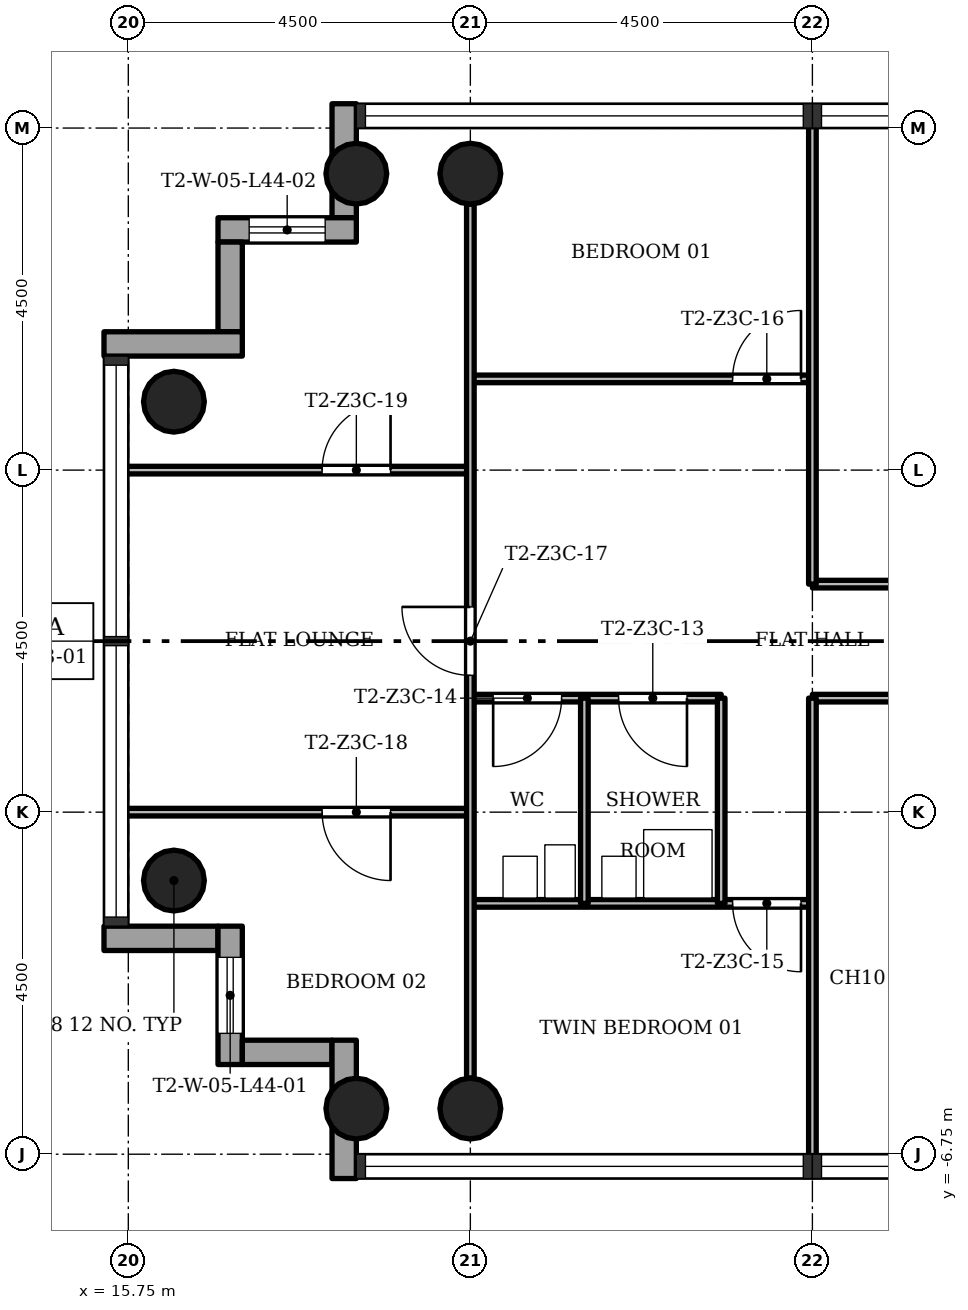
"""IFC4 building model, lengths in metres.
Left out: names, types, materials, properties, quantities, classifications, styles, units other than length and angle.
Written with IfcOpenShell. Run it as: python <this file> out.ifc"""

import sys

from ifc_helpers import new_model, si_unit, direction, frame, frame_2d, origin, origin_2d, place, context, subcontext, project, spatial, rectangle, hollow_circle, extrude, element, fill, save


model = new_model("IFC4")
c1 = context("Model", 3, precision=1e-05, world=origin(), true_north=direction((0.0, 1.0)))
c2 = subcontext(c1, "Body", "Model", "MODEL_VIEW")
j1 = project(units=[si_unit("LENGTHUNIT", "METRE"), si_unit("PLANEANGLEUNIT", "RADIAN")], contexts=[c1])
p1 = place(None, origin())
s1 = spatial("IfcSite", under=j1, at=p1, CompositionType="ELEMENT")
p2 = place(p1, origin())
s2 = spatial("IfcBuilding", under=s1, at=p2, CompositionType="ELEMENT")
p3 = place(p2, frame((0.0, 0.0, 160.9)))
s3 = spatial("IfcBuildingStorey", under=s2, at=p3, CompositionType="ELEMENT", Elevation=160.9)
for number, where, z_axis, x_axis in (
    (1, (20.25, 6.15, 0.0), (0.0, 0.0, 1.0), (1.0, 0.0, 0.0)),
    (2, (20.25, -6.15, 0.0), (0.0, 0.0, 1.0), (1.0, 0.0, 0.0)),
    (3, (18.75, 6.15, 0.0), (0.0, 0.0, 1.0), (1.0, 0.0, 0.0)),
    (4, (18.75, -6.15, 0.0), (0.0, 0.0, 1.0), (1.0, 0.0, 0.0)),
    (5, (16.35, 3.15, 0.0), (0.0, 0.0, 1.0), (1.0, 0.0, 0.0)),
    (6, (16.35, -3.15, 0.0), (0.0, 0.0, 1.0), (1.0, 0.0, 0.0)),
):
    element("IfcColumn", number, at=place(p3, frame(where, z_axis=z_axis, x_axis=x_axis)), inside=s3, PredefinedType="COLUMN", context=c2, shape_type="SweptSolid", body=[
        extrude(hollow_circle(Radius=0.4, WallThickness=0.028, at=origin_2d()), origin(), (0.0, 0.0, 1.0), 3.4),
    ])
p4 = place(p3, frame((18.59, 7.07, -0.3), z_axis=(0.0, 0.0, 1.0), x_axis=(0.0, -1.0, 0.0)))
e7 = element("IfcWall", 7, at=p4, inside=s3, PredefinedType="STANDARD", context=c2, shape_type="SweptSolid", body=[
    extrude(rectangle(XDim=1.5, YDim=0.32, at=frame_2d((0.75, 0.0))), origin(), (0.0, 0.0, 1.0), 3.4),
])
p5 = place(p3, frame((18.75, 5.41, -0.3), z_axis=(0.0, 0.0, 1.0), x_axis=(-1.0, 0.0, 0.0)))
e8 = element("IfcWall", 8, at=p5, inside=s3, PredefinedType="STANDARD", context=c2, shape_type="SweptSolid", body=[
    extrude(rectangle(XDim=1.82, YDim=0.32, at=frame_2d((0.91, 0.0))), origin(), (0.0, 0.0, 1.0), 3.4),
])
p6 = place(p5, frame((0.41, 0.0, 1.2)))
e9 = element("IfcOpeningElement", 9, at=p6, cuts=e8, PredefinedType="OPENING", context=c2, shape_type="SweptSolid", body=[
    extrude(rectangle(XDim=1.0, YDim=1.5, at=frame_2d((0.5, 0.75))), frame((0.0, 0.17, 0.0), z_axis=(0.0, -1.0, 0.0), x_axis=(1.0, 0.0, 0.0)), (0.0, 0.0, 1.0), 0.34),
])
p7 = place(p3, frame((17.09, 5.25, -0.3), z_axis=(0.0, 0.0, 1.0), x_axis=(0.0, -1.0, 0.0)))
e10 = element("IfcWall", 10, at=p7, inside=s3, PredefinedType="STANDARD", context=c2, shape_type="SweptSolid", body=[
    extrude(rectangle(XDim=1.18, YDim=0.32, at=frame_2d((0.59, 0.0))), origin(), (0.0, 0.0, 1.0), 3.4),
])
p8 = place(p3, frame((17.25, 3.91, -0.3), z_axis=(0.0, 0.0, 1.0), x_axis=(-1.0, 0.0, 0.0)))
e11 = element("IfcWall", 11, at=p8, inside=s3, PredefinedType="STANDARD", context=c2, shape_type="SweptSolid", body=[
    extrude(rectangle(XDim=1.82, YDim=0.32, at=frame_2d((0.91, 0.0))), origin(), (0.0, 0.0, 1.0), 3.4),
])
p9 = place(p3, frame((15.43, -3.91, -0.3), z_axis=(0.0, 0.0, 1.0), x_axis=(1.0, 0.0, 0.0)))
e12 = element("IfcWall", 12, at=p9, inside=s3, PredefinedType="STANDARD", context=c2, shape_type="SweptSolid", body=[
    extrude(rectangle(XDim=1.5, YDim=0.32, at=frame_2d((0.75, 0.0))), origin(), (0.0, 0.0, 1.0), 3.4),
])
p10 = place(p3, frame((17.09, -3.75, -0.3), z_axis=(0.0, 0.0, 1.0), x_axis=(0.0, -1.0, 0.0)))
e13 = element("IfcWall", 13, at=p10, inside=s3, PredefinedType="STANDARD", context=c2, shape_type="SweptSolid", body=[
    extrude(rectangle(XDim=1.82, YDim=0.32, at=frame_2d((0.91, 0.0))), origin(), (0.0, 0.0, 1.0), 3.4),
])
p11 = place(p10, frame((0.41, 0.0, 1.2)))
e14 = element("IfcOpeningElement", 14, at=p11, cuts=e13, PredefinedType="OPENING", context=c2, shape_type="SweptSolid", body=[
    extrude(rectangle(XDim=1.0, YDim=1.5, at=frame_2d((0.5, 0.75))), frame((0.0, 0.17, 0.0), z_axis=(0.0, -1.0, 0.0), x_axis=(1.0, 0.0, 0.0)), (0.0, 0.0, 1.0), 0.34),
])
p12 = place(p3, frame((17.25, -5.41, -0.3), z_axis=(0.0, 0.0, 1.0), x_axis=(1.0, 0.0, 0.0)))
e15 = element("IfcWall", 15, at=p12, inside=s3, PredefinedType="STANDARD", context=c2, shape_type="SweptSolid", body=[
    extrude(rectangle(XDim=1.18, YDim=0.32, at=frame_2d((0.59, 0.0))), origin(), (0.0, 0.0, 1.0), 3.4),
])
p13 = place(p3, frame((18.59, -5.25, -0.3), z_axis=(0.0, 0.0, 1.0), x_axis=(0.0, -1.0, 0.0)))
e16 = element("IfcWall", 16, at=p13, inside=s3, PredefinedType="STANDARD", context=c2, shape_type="SweptSolid", body=[
    extrude(rectangle(XDim=1.82, YDim=0.32, at=frame_2d((0.91, 0.0))), origin(), (0.0, 0.0, 1.0), 3.4),
])
p14 = place(p3, frame((24.75, -3.45, 0.0), z_axis=(0.0, 0.0, 1.0), x_axis=(-1.0, 0.0, 0.0)))
e17 = element("IfcWall", 17, at=p14, inside=s3, PredefinedType="PARTITIONING", context=c2, shape_type="SweptSolid", body=[
    extrude(rectangle(XDim=4.5, YDim=0.1, at=frame_2d((2.25, 0.0))), origin(), (0.0, 0.0, 1.0), 3.0),
])
p15 = place(p14, frame((0.15, 0.0, 0.0)))
e18 = element("IfcOpeningElement", 18, at=p15, cuts=e17, PredefinedType="OPENING", context=c2, shape_type="SweptSolid", body=[
    extrude(rectangle(XDim=0.9, YDim=2.1, at=frame_2d((0.45, 1.05))), frame((0.0, 0.06, 0.0), z_axis=(0.0, -1.0, 0.0), x_axis=(1.0, 0.0, 0.0)), (0.0, 0.0, 1.0), 0.12),
])
p16 = place(p3, frame((20.25, -2.25, 0.0), z_axis=(0.0, 0.0, 1.0), x_axis=(-1.0, 0.0, 0.0)))
e19 = element("IfcWall", 19, at=p16, inside=s3, PredefinedType="PARTITIONING", context=c2, shape_type="SweptSolid", body=[
    extrude(rectangle(XDim=4.6, YDim=0.1, at=frame_2d((2.3, 0.0))), origin(), (0.0, 0.0, 1.0), 3.0),
])
p17 = place(p16, frame((1.05, 0.0, 0.0)))
e20 = element("IfcOpeningElement", 20, at=p17, cuts=e19, PredefinedType="OPENING", context=c2, shape_type="SweptSolid", body=[
    extrude(rectangle(XDim=0.9, YDim=2.1, at=frame_2d((0.45, 1.05))), frame((0.0, 0.06, 0.0), z_axis=(0.0, -1.0, 0.0), x_axis=(1.0, 0.0, 0.0)), (0.0, 0.0, 1.0), 0.12),
])
p18 = place(p3, frame((29.25, -0.75, 0.0), z_axis=(0.0, 0.0, 1.0), x_axis=(-1.0, 0.0, 0.0)))
e21 = element("IfcWall", 21, at=p18, inside=s3, PredefinedType="PARTITIONING", context=c2, shape_type="SweptSolid", body=[
    extrude(rectangle(XDim=4.5, YDim=0.1, at=frame_2d((2.25, 0.0))), origin(), (0.0, 0.0, 1.0), 3.0),
])
p19 = place(p18, frame((1.8, 0.0, 0.0)))
e22 = element("IfcOpeningElement", 22, at=p19, cuts=e21, PredefinedType="OPENING", context=c2, shape_type="SweptSolid", body=[
    extrude(rectangle(XDim=0.9, YDim=2.1, at=frame_2d((0.45, 1.05))), frame((0.0, 0.06, 0.0), z_axis=(0.0, -1.0, 0.0), x_axis=(1.0, 0.0, 0.0)), (0.0, 0.0, 1.0), 0.12),
])
p20 = place(p3, frame((23.55, -0.75, 0.0), z_axis=(0.0, 0.0, 1.0), x_axis=(-1.0, 0.0, 0.0)))
e23 = element("IfcWall", 23, at=p20, inside=s3, PredefinedType="PARTITIONING", context=c2, shape_type="SweptSolid", body=[
    extrude(rectangle(XDim=3.3, YDim=0.1, at=frame_2d((1.65, 0.0))), origin(), (0.0, 0.0, 1.0), 3.0),
])
p21 = place(p20, frame((0.45, 0.0, 0.0)))
e24 = element("IfcOpeningElement", 24, at=p21, cuts=e23, PredefinedType="OPENING", context=c2, shape_type="SweptSolid", body=[
    extrude(rectangle(XDim=0.9, YDim=2.1, at=frame_2d((0.45, 1.05))), frame((0.0, 0.06, 0.0), z_axis=(0.0, -1.0, 0.0), x_axis=(1.0, 0.0, 0.0)), (0.0, 0.0, 1.0), 0.12),
])
p22 = place(p20, frame((2.1, 0.0, 0.0)))
e25 = element("IfcOpeningElement", 25, at=p22, cuts=e23, PredefinedType="OPENING", context=c2, shape_type="SweptSolid", body=[
    extrude(rectangle(XDim=0.9, YDim=2.1, at=frame_2d((0.45, 1.05))), frame((0.0, 0.06, 0.0), z_axis=(0.0, -1.0, 0.0), x_axis=(1.0, 0.0, 0.0)), (0.0, 0.0, 1.0), 0.12),
])
p23 = place(p3, frame((29.25, 0.75, 0.0), z_axis=(0.0, 0.0, 1.0), x_axis=(-1.0, 0.0, 0.0)))
e26 = element("IfcWall", 26, at=p23, inside=s3, PredefinedType="PARTITIONING", context=c2, shape_type="SweptSolid", body=[
    extrude(rectangle(XDim=4.5, YDim=0.1, at=frame_2d((2.25, 0.0))), origin(), (0.0, 0.0, 1.0), 3.0),
])
p24 = place(p23, frame((1.8, 0.0, 0.0)))
e27 = element("IfcOpeningElement", 27, at=p24, cuts=e26, PredefinedType="OPENING", context=c2, shape_type="SweptSolid", body=[
    extrude(rectangle(XDim=0.9, YDim=2.1, at=frame_2d((0.45, 1.05))), frame((0.0, 0.06, 0.0), z_axis=(0.0, -1.0, 0.0), x_axis=(1.0, 0.0, 0.0)), (0.0, 0.0, 1.0), 0.12),
])
p25 = place(p3, frame((20.25, 2.25, 0.0), z_axis=(0.0, 0.0, 1.0), x_axis=(-1.0, 0.0, 0.0)))
e28 = element("IfcWall", 28, at=p25, inside=s3, PredefinedType="PARTITIONING", context=c2, shape_type="SweptSolid", body=[
    extrude(rectangle(XDim=4.6, YDim=0.1, at=frame_2d((2.3, 0.0))), origin(), (0.0, 0.0, 1.0), 3.0),
])
p26 = place(p25, frame((1.05, 0.0, 0.0)))
e29 = element("IfcOpeningElement", 29, at=p26, cuts=e28, PredefinedType="OPENING", context=c2, shape_type="SweptSolid", body=[
    extrude(rectangle(XDim=0.9, YDim=2.1, at=frame_2d((0.45, 1.05))), frame((0.0, 0.06, 0.0), z_axis=(0.0, -1.0, 0.0), x_axis=(1.0, 0.0, 0.0)), (0.0, 0.0, 1.0), 0.12),
])
p27 = place(p3, frame((24.75, 3.45, 0.0), z_axis=(0.0, 0.0, 1.0), x_axis=(-1.0, 0.0, 0.0)))
e30 = element("IfcWall", 30, at=p27, inside=s3, PredefinedType="PARTITIONING", context=c2, shape_type="SweptSolid", body=[
    extrude(rectangle(XDim=4.5, YDim=0.1, at=frame_2d((2.25, 0.0))), origin(), (0.0, 0.0, 1.0), 3.0),
])
p28 = place(p27, frame((0.15, 0.0, 0.0)))
e31 = element("IfcOpeningElement", 31, at=p28, cuts=e30, PredefinedType="OPENING", context=c2, shape_type="SweptSolid", body=[
    extrude(rectangle(XDim=0.9, YDim=2.1, at=frame_2d((0.45, 1.05))), frame((0.0, 0.06, 0.0), z_axis=(0.0, -1.0, 0.0), x_axis=(1.0, 0.0, 0.0)), (0.0, 0.0, 1.0), 0.12),
])
for number, where, z_axis, x_axis in (
    (32, (24.75, -6.85, 0.0), (0.0, 0.0, 1.0), (0.0, 1.0, 0.0)),
    (33, (24.75, 0.75, 0.0), (0.0, 0.0, 1.0), (0.0, 1.0, 0.0)),
):
    element("IfcWall", number, at=place(p3, frame(where, z_axis=z_axis, x_axis=x_axis)), inside=s3, PredefinedType="PARTITIONING", context=c2, shape_type="SweptSolid", body=[
        extrude(rectangle(XDim=6.1, YDim=0.1, at=frame_2d((3.05, 0.0))), origin(), (0.0, 0.0, 1.0), 3.0),
    ])
for number, where, z_axis, x_axis in (
    (34, (23.55, -3.45, 0.0), (0.0, 0.0, 1.0), (0.0, 1.0, 0.0)),
    (35, (21.75, -3.45, 0.0), (0.0, 0.0, 1.0), (0.0, 1.0, 0.0)),
):
    element("IfcWall", number, at=place(p3, frame(where, z_axis=z_axis, x_axis=x_axis)), inside=s3, PredefinedType="PARTITIONING", context=c2, shape_type="SweptSolid", body=[
        extrude(rectangle(XDim=2.7, YDim=0.1, at=frame_2d((1.35, 0.0))), origin(), (0.0, 0.0, 1.0), 3.0),
    ])
p29 = place(p3, frame((20.25, -5.75, 0.0), z_axis=(0.0, 0.0, 1.0), x_axis=(0.0, 1.0, 0.0)))
e36 = element("IfcWall", 36, at=p29, inside=s3, PredefinedType="PARTITIONING", context=c2, shape_type="SweptSolid", body=[
    extrude(rectangle(XDim=11.5, YDim=0.1, at=frame_2d((5.75, 0.0))), origin(), (0.0, 0.0, 1.0), 3.0),
])
p30 = place(p29, frame((5.3, 0.0, 0.0)))
e37 = element("IfcOpeningElement", 37, at=p30, cuts=e36, PredefinedType="OPENING", context=c2, shape_type="SweptSolid", body=[
    extrude(rectangle(XDim=0.9, YDim=2.1, at=frame_2d((0.45, 1.05))), frame((0.0, 0.06, 0.0), z_axis=(0.0, -1.0, 0.0), x_axis=(1.0, 0.0, 0.0)), (0.0, 0.0, 1.0), 0.12),
])
p31 = place(p21, origin())
e38 = element("IfcDoor", 38, at=p31, inside=s3, OperationType="SINGLE_SWING_RIGHT", PredefinedType="DOOR", context=c2, shape_type="SweptSolid", body=[
    extrude(rectangle(XDim=0.9, YDim=2.1, at=frame_2d((0.45, 1.05))), frame((0.0, 0.025, 0.0), z_axis=(0.0, -1.0, 0.0), x_axis=(1.0, 0.0, 0.0)), (0.0, 0.0, 1.0), 0.05),
])
fill(e24, e38)
p32 = place(p22, origin())
e39 = element("IfcDoor", 39, at=p32, inside=s3, OperationType="SINGLE_SWING_LEFT", PredefinedType="DOOR", context=c2, shape_type="SweptSolid", body=[
    extrude(rectangle(XDim=0.9, YDim=2.1, at=frame_2d((0.45, 1.05))), frame((0.0, 0.025, 0.0), z_axis=(0.0, -1.0, 0.0), x_axis=(1.0, 0.0, 0.0)), (0.0, 0.0, 1.0), 0.05),
])
fill(e25, e39)
p33 = place(p15, origin())
e40 = element("IfcDoor", 40, at=p33, inside=s3, OperationType="SINGLE_SWING_RIGHT", PredefinedType="DOOR", context=c2, shape_type="SweptSolid", body=[
    extrude(rectangle(XDim=0.9, YDim=2.1, at=frame_2d((0.45, 1.05))), frame((0.0, 0.025, 0.0), z_axis=(0.0, -1.0, 0.0), x_axis=(1.0, 0.0, 0.0)), (0.0, 0.0, 1.0), 0.05),
])
fill(e18, e40)
p34 = place(p28, origin())
e41 = element("IfcDoor", 41, at=p34, inside=s3, OperationType="SINGLE_SWING_LEFT", PredefinedType="DOOR", context=c2, shape_type="SweptSolid", body=[
    extrude(rectangle(XDim=0.9, YDim=2.1, at=frame_2d((0.45, 1.05))), frame((0.0, 0.025, 0.0), z_axis=(0.0, -1.0, 0.0), x_axis=(1.0, 0.0, 0.0)), (0.0, 0.0, 1.0), 0.05),
])
fill(e31, e41)
p35 = place(p30, origin())
e42 = element("IfcDoor", 42, at=p35, inside=s3, OperationType="SINGLE_SWING_LEFT", PredefinedType="DOOR", context=c2, shape_type="SweptSolid", body=[
    extrude(rectangle(XDim=0.9, YDim=2.1, at=frame_2d((0.45, 1.05))), frame((0.0, 0.025, 0.0), z_axis=(0.0, -1.0, 0.0), x_axis=(1.0, 0.0, 0.0)), (0.0, 0.0, 1.0), 0.05),
])
fill(e37, e42)
p36 = place(p17, origin())
e43 = element("IfcDoor", 43, at=p36, inside=s3, OperationType="SINGLE_SWING_RIGHT", PredefinedType="DOOR", context=c2, shape_type="SweptSolid", body=[
    extrude(rectangle(XDim=0.9, YDim=2.1, at=frame_2d((0.45, 1.05))), frame((0.0, 0.025, 0.0), z_axis=(0.0, -1.0, 0.0), x_axis=(1.0, 0.0, 0.0)), (0.0, 0.0, 1.0), 0.05),
])
fill(e20, e43)
p37 = place(p26, origin())
e44 = element("IfcDoor", 44, at=p37, inside=s3, OperationType="SINGLE_SWING_LEFT", PredefinedType="DOOR", context=c2, shape_type="SweptSolid", body=[
    extrude(rectangle(XDim=0.9, YDim=2.1, at=frame_2d((0.45, 1.05))), frame((0.0, 0.025, 0.0), z_axis=(0.0, -1.0, 0.0), x_axis=(1.0, 0.0, 0.0)), (0.0, 0.0, 1.0), 0.05),
])
fill(e29, e44)
p38 = place(p11, origin())
e45 = element("IfcWindow", 45, at=p38, inside=s3, PartitioningType="SINGLE_PANEL", PredefinedType="WINDOW", context=c2, shape_type="SweptSolid", body=[
    extrude(rectangle(XDim=1.0, YDim=1.5, at=frame_2d((0.5, 0.75))), frame((0.0, 0.03, 0.0), z_axis=(0.0, -1.0, 0.0), x_axis=(1.0, 0.0, 0.0)), (0.0, 0.0, 1.0), 0.06),
])
fill(e14, e45)
p39 = place(p6, origin())
e46 = element("IfcWindow", 46, at=p39, inside=s3, PartitioningType="SINGLE_PANEL", PredefinedType="WINDOW", context=c2, shape_type="SweptSolid", body=[
    extrude(rectangle(XDim=1.0, YDim=1.5, at=frame_2d((0.5, 0.75))), frame((0.0, 0.03, 0.0), z_axis=(0.0, -1.0, 0.0), x_axis=(1.0, 0.0, 0.0)), (0.0, 0.0, 1.0), 0.06),
])
fill(e9, e46)
save(model, sys.argv[1])
